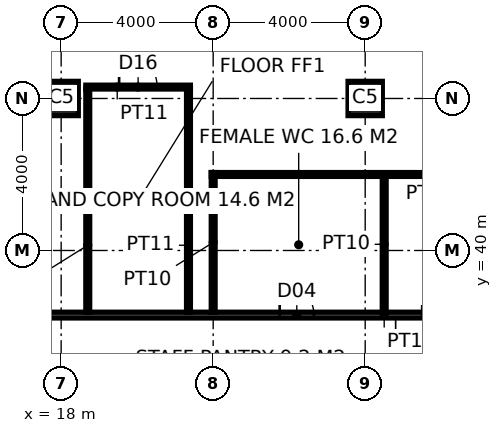
"""IFC4 building model, lengths in metres.
Left out: names, types, materials, properties, quantities, classifications, styles, units other than length and angle.
Written with IfcOpenShell. Run it as: python <this file> out.ifc"""

import sys

from ifc_helpers import new_model, si_unit, direction, frame, frame_2d, origin, origin_2d, place, context, subcontext, project, spatial, rectangle, hollow_rectangle, extrude, element, fill, save


model = new_model("IFC4")
c1 = context("Model", 3, precision=1e-05, world=origin(), true_north=direction((0.0, 1.0)))
c2 = subcontext(c1, "Body", "Model", "MODEL_VIEW")
j1 = project(units=[si_unit("LENGTHUNIT", "METRE"), si_unit("PLANEANGLEUNIT", "RADIAN")], contexts=[c1])
p1 = place(None, origin())
s1 = spatial("IfcSite", under=j1, at=p1, CompositionType="ELEMENT")
p2 = place(p1, origin())
s2 = spatial("IfcBuilding", under=s1, at=p2, CompositionType="ELEMENT")
p3 = place(p2, frame((0.0, 0.0, 175.8)))
s3 = spatial("IfcBuildingStorey", under=s2, at=p3, CompositionType="ELEMENT", Elevation=175.8)
for number, where, z_axis, x_axis in (
    (1, (18.0, 44.0, 0.0), (0.0, 0.0, 1.0), (1.0, 0.0, 0.0)),
    (2, (26.0, 44.0, 0.0), (0.0, 0.0, 1.0), (1.0, 0.0, 0.0)),
):
    element("IfcColumn", number, at=place(p3, frame(where, z_axis=z_axis, x_axis=x_axis)), inside=s3, PredefinedType="COLUMN", context=c2, shape_type="SweptSolid", body=[
        extrude(hollow_rectangle(XDim=0.9, YDim=0.9, WallThickness=0.1, at=origin_2d()), origin(), (0.0, 0.0, 1.0), 4.0),
    ])
p4 = place(p3, frame((15.175, 38.3, 0.0), z_axis=(0.0, 0.0, 1.0), x_axis=(1.0, 0.0, 0.0)))
e3 = element("IfcWall", 3, at=p4, inside=s3, PredefinedType="PARTITIONING", context=c2, shape_type="SweptSolid", body=[
    extrude(rectangle(XDim=22.65, YDim=0.15, at=frame_2d((11.325, 0.0))), origin(), (0.0, 0.0, 1.0), 3.85),
])
p5 = place(p4, frame((8.575, 0.0, 0.0)))
e4 = element("IfcOpeningElement", 4, at=p5, cuts=e3, PredefinedType="OPENING", context=c2, shape_type="SweptSolid", body=[
    extrude(rectangle(XDim=0.9, YDim=2.1, at=frame_2d((0.45, 1.05))), frame((0.0, 0.085, 0.0), z_axis=(0.0, -1.0, 0.0), x_axis=(1.0, 0.0, 0.0)), (0.0, 0.0, 1.0), 0.17),
])
p6 = place(p4, frame((12.325, 0.0, 0.0)))
e5 = element("IfcOpeningElement", 5, at=p6, cuts=e3, PredefinedType="OPENING", context=c2, shape_type="SweptSolid", body=[
    extrude(rectangle(XDim=1.0, YDim=2.1, at=frame_2d((0.5, 1.05))), frame((0.0, 0.085, 0.0), z_axis=(0.0, -1.0, 0.0), x_axis=(1.0, 0.0, 0.0)), (0.0, 0.0, 1.0), 0.17),
])
p7 = place(p4, frame((16.175, 0.0, 0.0)))
e6 = element("IfcOpeningElement", 6, at=p7, cuts=e3, PredefinedType="OPENING", context=c2, shape_type="SweptSolid", body=[
    extrude(rectangle(XDim=0.9, YDim=2.1, at=frame_2d((0.45, 1.05))), frame((0.0, 0.085, 0.0), z_axis=(0.0, -1.0, 0.0), x_axis=(1.0, 0.0, 0.0)), (0.0, 0.0, 1.0), 0.17),
])
p8 = place(p3, frame((22.0, 38.375, 0.0), z_axis=(0.0, 0.0, 1.0), x_axis=(0.0, 1.0, 0.0)))
e7 = element("IfcWall", 7, at=p8, inside=s3, PredefinedType="PARTITIONING", context=c2, shape_type="SweptSolid", body=[
    extrude(rectangle(XDim=3.675, YDim=0.1, at=frame_2d((1.837, 0.0))), origin(), (0.0, 0.0, 1.0), 2.95),
])
p9 = place(p3, frame((21.95, 42.0, 0.0), z_axis=(0.0, 0.0, 1.0), x_axis=(1.0, 0.0, 0.0)))
e8 = element("IfcWall", 8, at=p9, inside=s3, PredefinedType="PARTITIONING", context=c2, shape_type="SweptSolid", body=[
    extrude(rectangle(XDim=12.1, YDim=0.1, at=frame_2d((6.05, 0.0))), origin(), (0.0, 0.0, 1.0), 3.85),
])
p10 = place(p3, frame((26.5, 38.375, 0.0), z_axis=(0.0, 0.0, 1.0), x_axis=(0.0, 1.0, 0.0)))
e9 = element("IfcWall", 9, at=p10, inside=s3, PredefinedType="PARTITIONING", context=c2, shape_type="SweptSolid", body=[
    extrude(rectangle(XDim=3.575, YDim=0.1, at=frame_2d((1.788, 0.0))), origin(), (0.0, 0.0, 1.0), 3.85),
])
p11 = place(p3, frame((18.65, 44.3, 0.0), z_axis=(0.0, 0.0, 1.0), x_axis=(1.0, 0.0, 0.0)))
e10 = element("IfcWall", 10, at=p11, inside=s3, PredefinedType="PARTITIONING", context=c2, shape_type="SweptSolid", body=[
    extrude(rectangle(XDim=2.75, YDim=0.1, at=frame_2d((1.375, 0.0))), origin(), (0.0, 0.0, 1.0), 3.85),
])
p12 = place(p11, frame((0.875, 0.0, 0.0)))
e11 = element("IfcOpeningElement", 11, at=p12, cuts=e10, PredefinedType="OPENING", context=c2, shape_type="SweptSolid", body=[
    extrude(rectangle(XDim=1.0, YDim=2.2, at=frame_2d((0.5, 1.1))), frame((0.0, 0.06, 0.0), z_axis=(0.0, -1.0, 0.0), x_axis=(1.0, 0.0, 0.0)), (0.0, 0.0, 1.0), 0.12),
])
for number, where, z_axis, x_axis in (
    (12, (18.7, 38.375, 0.0), (0.0, 0.0, 1.0), (0.0, 1.0, 0.0)),
    (13, (21.35, 38.375, 0.0), (0.0, 0.0, 1.0), (0.0, 1.0, 0.0)),
):
    element("IfcWall", number, at=place(p3, frame(where, z_axis=z_axis, x_axis=x_axis)), inside=s3, PredefinedType="PARTITIONING", context=c2, shape_type="SweptSolid", body=[
        extrude(rectangle(XDim=5.875, YDim=0.1, at=frame_2d((2.938, 0.0))), origin(), (0.0, 0.0, 1.0), 3.85),
    ])
p13 = place(p5, origin())
e14 = element("IfcDoor", 14, at=p13, inside=s3, OperationType="SINGLE_SWING_LEFT", PredefinedType="DOOR", context=c2, shape_type="SweptSolid", body=[
    extrude(rectangle(XDim=0.9, YDim=2.1, at=frame_2d((0.45, 1.05))), frame((0.0, 0.025, 0.0), z_axis=(0.0, -1.0, 0.0), x_axis=(1.0, 0.0, 0.0)), (0.0, 0.0, 1.0), 0.05),
])
fill(e4, e14)
p14 = place(p12, origin())
e15 = element("IfcDoor", 15, at=p14, inside=s3, OperationType="SINGLE_SWING_LEFT", PredefinedType="DOOR", context=c2, shape_type="SweptSolid", body=[
    extrude(rectangle(XDim=1.0, YDim=2.2, at=frame_2d((0.5, 1.1))), frame((0.0, 0.025, 0.0), z_axis=(0.0, -1.0, 0.0), x_axis=(1.0, 0.0, 0.0)), (0.0, 0.0, 1.0), 0.05),
])
fill(e11, e15)
save(model, sys.argv[1])
